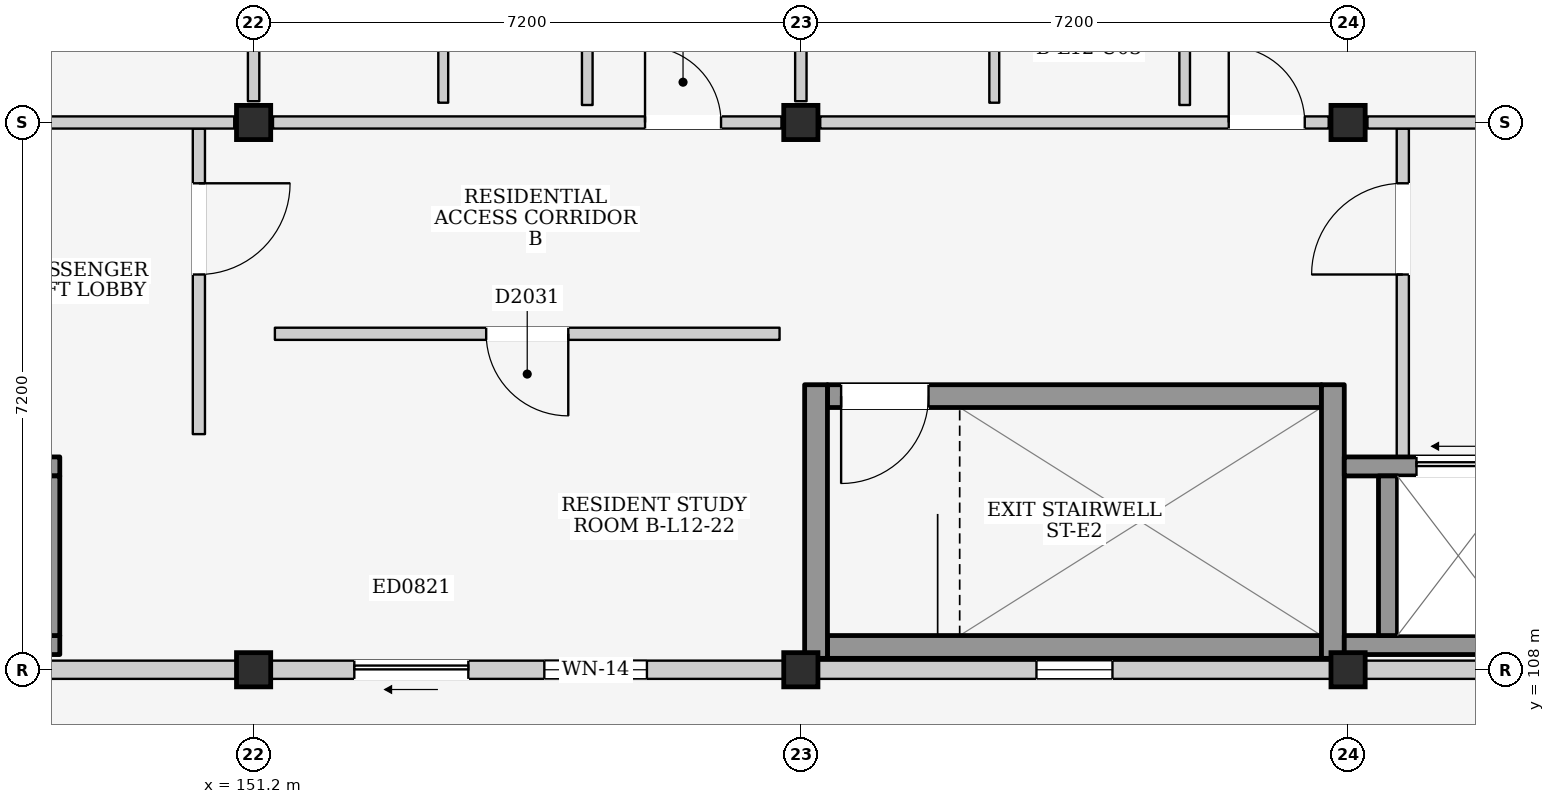
"""IFC4 building model, lengths in metres.
Left out: names, types, materials, properties, quantities, classifications, styles, units other than length and angle.
Written with IfcOpenShell. Run it as: python <this file> out.ifc"""

import sys

from ifc_helpers import new_model, si_unit, direction, frame, frame_2d, origin, origin_2d, place, context, subcontext, project, spatial, rectangle, extrude, element, fill, save


model = new_model("IFC4")
c1 = context("Model", 3, precision=1e-05, world=origin(), true_north=direction((0.0, 1.0)))
c2 = subcontext(c1, "Body", "Model", "MODEL_VIEW")
j1 = project(units=[si_unit("LENGTHUNIT", "METRE"), si_unit("PLANEANGLEUNIT", "RADIAN")], contexts=[c1])
p1 = place(None, origin())
s1 = spatial("IfcSite", under=j1, at=p1, CompositionType="ELEMENT")
p2 = place(p1, origin())
s2 = spatial("IfcBuilding", under=s1, at=p2, CompositionType="ELEMENT")
p3 = place(p2, frame((0.0, 0.0, 41.2)))
s3 = spatial("IfcBuildingStorey", under=s2, at=p3, CompositionType="ELEMENT", Elevation=41.2)
for number, where, z_axis, x_axis in (
    (1, (151.2, 108.0, 0.0), (0.0, 0.0, 1.0), (1.0, 0.0, 0.0)),
    (2, (151.2, 115.2, 0.0), (0.0, 0.0, 1.0), (1.0, 0.0, 0.0)),
    (3, (158.4, 108.0, 0.0), (0.0, 0.0, 1.0), (1.0, 0.0, 0.0)),
    (4, (158.4, 115.2, 0.0), (0.0, 0.0, 1.0), (1.0, 0.0, 0.0)),
    (5, (165.6, 108.0, 0.0), (0.0, 0.0, 1.0), (1.0, 0.0, 0.0)),
    (6, (165.6, 115.2, 0.0), (0.0, 0.0, 1.0), (1.0, 0.0, 0.0)),
):
    element("IfcColumn", number, at=place(p3, frame(where, z_axis=z_axis, x_axis=x_axis)), inside=s3, PredefinedType="COLUMN", context=c2, shape_type="SweptSolid", body=[
        extrude(rectangle(XDim=0.45, YDim=0.45, at=origin_2d()), origin(), (0.0, 0.0, 1.0), 3.2),
    ])
p4 = place(p3, frame((144.225, 108.0, 0.0), z_axis=(0.0, 0.0, 1.0), x_axis=(1.0, 0.0, 0.0)))
e7 = element("IfcWall", 7, at=p4, inside=s3, PredefinedType="ELEMENTEDWALL", context=c2, shape_type="SweptSolid", body=[
    extrude(rectangle(XDim=6.75, YDim=0.24, at=frame_2d((3.375, 0.0))), origin(), (0.0, 0.0, 1.0), 2.345),
])
p5 = place(p4, frame((2.875, 0.0, 1.2)))
e8 = element("IfcOpeningElement", 8, at=p5, cuts=e7, PredefinedType="OPENING", context=c2, shape_type="SweptSolid", body=[
    extrude(rectangle(XDim=1.0, YDim=0.9, at=frame_2d((0.5, 0.45))), frame((0.0, 0.135, 0.0), z_axis=(0.0, -1.0, 0.0), x_axis=(1.0, 0.0, 0.0)), (0.0, 0.0, 1.0), 0.27),
])
p6 = place(p3, frame((151.425, 108.0, 0.0), z_axis=(0.0, 0.0, 1.0), x_axis=(1.0, 0.0, 0.0)))
e9 = element("IfcWall", 9, at=p6, inside=s3, PredefinedType="ELEMENTEDWALL", context=c2, shape_type="SweptSolid", body=[
    extrude(rectangle(XDim=6.75, YDim=0.24, at=frame_2d((3.375, 0.0))), origin(), (0.0, 0.0, 1.0), 2.345),
])
p7 = place(p6, frame((1.1, 0.0, 0.0)))
e10 = element("IfcOpeningElement", 10, at=p7, cuts=e9, PredefinedType="OPENING", context=c2, shape_type="SweptSolid", body=[
    extrude(rectangle(XDim=1.5, YDim=2.12, at=frame_2d((0.75, 1.06))), frame((0.0, 0.135, 0.0), z_axis=(0.0, -1.0, 0.0), x_axis=(1.0, 0.0, 0.0)), (0.0, 0.0, 1.0), 0.27),
])
p8 = place(p6, frame((3.6, 0.0, 0.735)))
e11 = element("IfcOpeningElement", 11, at=p8, cuts=e9, PredefinedType="OPENING", context=c2, shape_type="SweptSolid", body=[
    extrude(rectangle(XDim=1.35, YDim=1.5, at=frame_2d((0.675, 0.75))), frame((0.0, 0.135, 0.0), z_axis=(0.0, -1.0, 0.0), x_axis=(1.0, 0.0, 0.0)), (0.0, 0.0, 1.0), 0.27),
])
p9 = place(p3, frame((158.625, 108.0, 0.0), z_axis=(0.0, 0.0, 1.0), x_axis=(1.0, 0.0, 0.0)))
e12 = element("IfcWall", 12, at=p9, inside=s3, PredefinedType="ELEMENTEDWALL", context=c2, shape_type="SweptSolid", body=[
    extrude(rectangle(XDim=6.75, YDim=0.24, at=frame_2d((3.375, 0.0))), origin(), (0.0, 0.0, 1.0), 2.345),
])
p10 = place(p9, frame((2.875, 0.0, 1.2)))
e13 = element("IfcOpeningElement", 13, at=p10, cuts=e12, PredefinedType="OPENING", context=c2, shape_type="SweptSolid", body=[
    extrude(rectangle(XDim=1.0, YDim=0.9, at=frame_2d((0.5, 0.45))), frame((0.0, 0.135, 0.0), z_axis=(0.0, -1.0, 0.0), x_axis=(1.0, 0.0, 0.0)), (0.0, 0.0, 1.0), 0.27),
])
p11 = place(p3, frame((165.825, 108.0, 0.0), z_axis=(0.0, 0.0, 1.0), x_axis=(1.0, 0.0, 0.0)))
e14 = element("IfcWall", 14, at=p11, inside=s3, PredefinedType="ELEMENTEDWALL", context=c2, shape_type="SweptSolid", body=[
    extrude(rectangle(XDim=6.75, YDim=0.24, at=frame_2d((3.375, 0.0))), origin(), (0.0, 0.0, 1.0), 2.345),
])
p12 = place(p11, frame((2.875, 0.0, 1.2)))
e15 = element("IfcOpeningElement", 15, at=p12, cuts=e14, PredefinedType="OPENING", context=c2, shape_type="SweptSolid", body=[
    extrude(rectangle(XDim=1.0, YDim=0.9, at=frame_2d((0.5, 0.45))), frame((0.0, 0.135, 0.0), z_axis=(0.0, -1.0, 0.0), x_axis=(1.0, 0.0, 0.0)), (0.0, 0.0, 1.0), 0.27),
])
p13 = place(p3, frame((150.48, 111.1, 0.0), z_axis=(0.0, 0.0, 1.0), x_axis=(0.0, 1.0, 0.0)))
e16 = element("IfcWall", 16, at=p13, inside=s3, PredefinedType="PARTITIONING", context=c2, shape_type="SweptSolid", body=[
    extrude(rectangle(XDim=4.02, YDim=0.16, at=frame_2d((2.01, 0.0))), origin(), (0.0, 0.0, 1.0), 2.95),
])
p14 = place(p13, frame((2.1, 0.0, 0.0)))
e17 = element("IfcOpeningElement", 17, at=p14, cuts=e16, PredefinedType="OPENING", context=c2, shape_type="SweptSolid", body=[
    extrude(rectangle(XDim=1.2, YDim=2.2, at=frame_2d((0.6, 1.1))), frame((0.0, 0.095, 0.0), z_axis=(0.0, -1.0, 0.0), x_axis=(1.0, 0.0, 0.0)), (0.0, 0.0, 1.0), 0.19),
])
p15 = place(p3, frame((146.625, 108.325, 0.0), z_axis=(0.0, 0.0, 1.0), x_axis=(1.0, 0.0, 0.0)))
e18 = element("IfcWall", 18, at=p15, inside=s3, PredefinedType="SHEAR", context=c2, shape_type="SweptSolid", body=[
    extrude(rectangle(XDim=2.025, YDim=0.25, at=frame_2d((1.012, 0.0))), origin(), (0.0, 0.0, 1.0), 2.95),
])
p16 = place(p3, frame((146.625, 110.675, 0.0), z_axis=(0.0, 0.0, 1.0), x_axis=(1.0, 0.0, 0.0)))
e19 = element("IfcWall", 19, at=p16, inside=s3, PredefinedType="SHEAR", context=c2, shape_type="SweptSolid", body=[
    extrude(rectangle(XDim=2.025, YDim=0.25, at=frame_2d((1.012, 0.0))), origin(), (0.0, 0.0, 1.0), 2.95),
])
p17 = place(p16, frame((0.425, 0.0, 0.0)))
e20 = element("IfcOpeningElement", 20, at=p17, cuts=e19, PredefinedType="OPENING", context=c2, shape_type="SweptSolid", body=[
    extrude(rectangle(XDim=1.1, YDim=2.15, at=frame_2d((0.55, 1.075))), frame((0.0, 0.14, 0.0), z_axis=(0.0, -1.0, 0.0), x_axis=(1.0, 0.0, 0.0)), (0.0, 0.0, 1.0), 0.28),
])
p18 = place(p3, frame((148.525, 108.45, 0.0), z_axis=(0.0, 0.0, 1.0), x_axis=(0.0, 1.0, 0.0)))
e21 = element("IfcWall", 21, at=p18, inside=s3, PredefinedType="SHEAR", context=c2, shape_type="SweptSolid", body=[
    extrude(rectangle(XDim=2.1, YDim=0.25, at=frame_2d((1.05, 0.0))), origin(), (0.0, 0.0, 1.0), 2.95),
])
p19 = place(p3, frame((158.75, 108.3, 0.0), z_axis=(0.0, 0.0, 1.0), x_axis=(1.0, 0.0, 0.0)))
e22 = element("IfcWall", 22, at=p19, inside=s3, PredefinedType="SHEAR", context=c2, shape_type="SweptSolid", body=[
    extrude(rectangle(XDim=6.5, YDim=0.3, at=frame_2d((3.25, 0.0))), origin(), (0.0, 0.0, 1.0), 2.95),
])
p20 = place(p3, frame((158.75, 111.6, 0.0), z_axis=(0.0, 0.0, 1.0), x_axis=(1.0, 0.0, 0.0)))
e23 = element("IfcWall", 23, at=p20, inside=s3, PredefinedType="SHEAR", context=c2, shape_type="SweptSolid", body=[
    extrude(rectangle(XDim=6.5, YDim=0.3, at=frame_2d((3.25, 0.0))), origin(), (0.0, 0.0, 1.0), 2.95),
])
p21 = place(p20, frame((0.18, 0.0, 0.0)))
e24 = element("IfcOpeningElement", 24, at=p21, cuts=e23, PredefinedType="OPENING", context=c2, shape_type="SweptSolid", body=[
    extrude(rectangle(XDim=1.15, YDim=2.2, at=frame_2d((0.575, 1.1))), frame((0.0, 0.165, 0.0), z_axis=(0.0, -1.0, 0.0), x_axis=(1.0, 0.0, 0.0)), (0.0, 0.0, 1.0), 0.33),
])
for number, where, z_axis, x_axis in (
    (25, (158.6, 108.15, 0.0), (0.0, 0.0, 1.0), (0.0, 1.0, 0.0)),
    (26, (165.4, 108.15, 0.0), (0.0, 0.0, 1.0), (0.0, 1.0, 0.0)),
):
    element("IfcWall", number, at=place(p3, frame(where, z_axis=z_axis, x_axis=x_axis)), inside=s3, PredefinedType="SHEAR", context=c2, shape_type="SweptSolid", body=[
        extrude(rectangle(XDim=3.6, YDim=0.3, at=frame_2d((1.8, 0.0))), origin(), (0.0, 0.0, 1.0), 2.95),
    ])
p22 = place(p3, frame((166.32, 110.8, 0.0), z_axis=(0.0, 0.0, 1.0), x_axis=(0.0, 1.0, 0.0)))
e27 = element("IfcWall", 27, at=p22, inside=s3, PredefinedType="PARTITIONING", context=c2, shape_type="SweptSolid", body=[
    extrude(rectangle(XDim=4.32, YDim=0.16, at=frame_2d((2.16, 0.0))), origin(), (0.0, 0.0, 1.0), 2.95),
])
p23 = place(p22, frame((2.4, 0.0, 0.0)))
e28 = element("IfcOpeningElement", 28, at=p23, cuts=e27, PredefinedType="OPENING", context=c2, shape_type="SweptSolid", body=[
    extrude(rectangle(XDim=1.2, YDim=2.2, at=frame_2d((0.6, 1.1))), frame((0.0, 0.095, 0.0), z_axis=(0.0, -1.0, 0.0), x_axis=(1.0, 0.0, 0.0)), (0.0, 0.0, 1.0), 0.19),
])
p24 = place(p3, frame((165.55, 108.325, 0.0), z_axis=(0.0, 0.0, 1.0), x_axis=(1.0, 0.0, 0.0)))
e29 = element("IfcWall", 29, at=p24, inside=s3, PredefinedType="SHEAR", context=c2, shape_type="SweptSolid", body=[
    extrude(rectangle(XDim=2.55, YDim=0.25, at=frame_2d((1.275, 0.0))), origin(), (0.0, 0.0, 1.0), 2.95),
])
p25 = place(p3, frame((165.55, 110.675, 0.0), z_axis=(0.0, 0.0, 1.0), x_axis=(1.0, 0.0, 0.0)))
e30 = element("IfcWall", 30, at=p25, inside=s3, PredefinedType="SHEAR", context=c2, shape_type="SweptSolid", body=[
    extrude(rectangle(XDim=2.55, YDim=0.25, at=frame_2d((1.275, 0.0))), origin(), (0.0, 0.0, 1.0), 2.95),
])
p26 = place(p25, frame((0.95, 0.0, 0.0)))
e31 = element("IfcOpeningElement", 31, at=p26, cuts=e30, PredefinedType="OPENING", context=c2, shape_type="SweptSolid", body=[
    extrude(rectangle(XDim=1.1, YDim=2.15, at=frame_2d((0.55, 1.075))), frame((0.0, 0.14, 0.0), z_axis=(0.0, -1.0, 0.0), x_axis=(1.0, 0.0, 0.0)), (0.0, 0.0, 1.0), 0.28),
])
p27 = place(p3, frame((166.125, 108.45, 0.0), z_axis=(0.0, 0.0, 1.0), x_axis=(0.0, 1.0, 0.0)))
e32 = element("IfcWall", 32, at=p27, inside=s3, PredefinedType="SHEAR", context=c2, shape_type="SweptSolid", body=[
    extrude(rectangle(XDim=2.1, YDim=0.25, at=frame_2d((1.05, 0.0))), origin(), (0.0, 0.0, 1.0), 2.95),
])
p28 = place(p3, frame((144.255, 115.2, 0.0), z_axis=(0.0, 0.0, 1.0), x_axis=(1.0, 0.0, 0.0)))
e33 = element("IfcWall", 33, at=p28, inside=s3, PredefinedType="PARTITIONING", context=c2, shape_type="SweptSolid", body=[
    extrude(rectangle(XDim=6.69, YDim=0.16, at=frame_2d((3.345, 0.0))), origin(), (0.0, 0.0, 1.0), 2.345),
])
p29 = place(p3, frame((151.2, 115.48, 0.0), z_axis=(0.0, 0.0, 1.0), x_axis=(0.0, 1.0, 0.0)))
e34 = element("IfcWall", 34, at=p29, inside=s3, PredefinedType="PARTITIONING", context=c2, shape_type="SweptSolid", body=[
    extrude(rectangle(XDim=6.64, YDim=0.15, at=frame_2d((3.32, 0.0))), origin(), (0.0, 0.0, 1.0), 2.445),
])
p30 = place(p3, frame((151.455, 115.2, 0.0), z_axis=(0.0, 0.0, 1.0), x_axis=(1.0, 0.0, 0.0)))
e35 = element("IfcWall", 35, at=p30, inside=s3, PredefinedType="PARTITIONING", context=c2, shape_type="SweptSolid", body=[
    extrude(rectangle(XDim=6.69, YDim=0.16, at=frame_2d((3.345, 0.0))), origin(), (0.0, 0.0, 1.0), 2.345),
])
p31 = place(p30, frame((4.895, 0.0, 0.0)))
e36 = element("IfcOpeningElement", 36, at=p31, cuts=e35, PredefinedType="OPENING", context=c2, shape_type="SweptSolid", body=[
    extrude(rectangle(XDim=1.0, YDim=2.15, at=frame_2d((0.5, 1.075))), frame((0.0, 0.095, 0.0), z_axis=(0.0, -1.0, 0.0), x_axis=(1.0, 0.0, 0.0)), (0.0, 0.0, 1.0), 0.19),
])
p32 = place(p3, frame((158.4, 115.48, 0.0), z_axis=(0.0, 0.0, 1.0), x_axis=(0.0, 1.0, 0.0)))
e37 = element("IfcWall", 37, at=p32, inside=s3, PredefinedType="PARTITIONING", context=c2, shape_type="SweptSolid", body=[
    extrude(rectangle(XDim=6.64, YDim=0.15, at=frame_2d((3.32, 0.0))), origin(), (0.0, 0.0, 1.0), 2.445),
])
p33 = place(p3, frame((153.695, 115.46, 0.0), z_axis=(0.0, 0.0, 1.0), x_axis=(0.0, 1.0, 0.0)))
e38 = element("IfcWall", 38, at=p33, inside=s3, PredefinedType="PARTITIONING", context=c2, shape_type="SweptSolid", body=[
    extrude(rectangle(XDim=2.33, YDim=0.13, at=frame_2d((1.165, 0.0))), origin(), (0.0, 0.0, 1.0), 2.95),
])
p34 = place(p3, frame((155.59, 115.43, 0.0), z_axis=(0.0, 0.0, 1.0), x_axis=(0.0, 1.0, 0.0)))
e39 = element("IfcWall", 39, at=p34, inside=s3, PredefinedType="PARTITIONING", context=c2, shape_type="SweptSolid", body=[
    extrude(rectangle(XDim=2.35, YDim=0.14, at=frame_2d((1.175, 0.0))), origin(), (0.0, 0.0, 1.0), 2.95),
])
p35 = place(p3, frame((158.655, 115.2, 0.0), z_axis=(0.0, 0.0, 1.0), x_axis=(1.0, 0.0, 0.0)))
e40 = element("IfcWall", 40, at=p35, inside=s3, PredefinedType="PARTITIONING", context=c2, shape_type="SweptSolid", body=[
    extrude(rectangle(XDim=6.69, YDim=0.16, at=frame_2d((3.345, 0.0))), origin(), (0.0, 0.0, 1.0), 2.345),
])
p36 = place(p35, frame((5.375, 0.0, 0.0)))
e41 = element("IfcOpeningElement", 41, at=p36, cuts=e40, PredefinedType="OPENING", context=c2, shape_type="SweptSolid", body=[
    extrude(rectangle(XDim=1.0, YDim=2.15, at=frame_2d((0.5, 1.075))), frame((0.0, 0.095, 0.0), z_axis=(0.0, -1.0, 0.0), x_axis=(1.0, 0.0, 0.0)), (0.0, 0.0, 1.0), 0.19),
])
p37 = place(p3, frame((165.855, 115.2, 0.0), z_axis=(0.0, 0.0, 1.0), x_axis=(1.0, 0.0, 0.0)))
e42 = element("IfcWall", 42, at=p37, inside=s3, PredefinedType="PARTITIONING", context=c2, shape_type="SweptSolid", body=[
    extrude(rectangle(XDim=6.69, YDim=0.16, at=frame_2d((3.345, 0.0))), origin(), (0.0, 0.0, 1.0), 2.345),
])
p38 = place(p3, frame((160.945, 115.46, 0.0), z_axis=(0.0, 0.0, 1.0), x_axis=(0.0, 1.0, 0.0)))
e43 = element("IfcWall", 43, at=p38, inside=s3, PredefinedType="PARTITIONING", context=c2, shape_type="SweptSolid", body=[
    extrude(rectangle(XDim=3.04, YDim=0.13, at=frame_2d((1.52, 0.0))), origin(), (0.0, 0.0, 1.0), 2.95),
])
p39 = place(p3, frame((163.45, 115.43, 0.0), z_axis=(0.0, 0.0, 1.0), x_axis=(0.0, 1.0, 0.0)))
e44 = element("IfcWall", 44, at=p39, inside=s3, PredefinedType="PARTITIONING", context=c2, shape_type="SweptSolid", body=[
    extrude(rectangle(XDim=3.06, YDim=0.14, at=frame_2d((1.53, 0.0))), origin(), (0.0, 0.0, 1.0), 2.95),
])
p40 = place(p3, frame((151.48, 112.42, 0.0), z_axis=(0.0, 0.0, 1.0), x_axis=(1.0, 0.0, 0.0)))
e45 = element("IfcWall", 45, at=p40, inside=s3, PredefinedType="PARTITIONING", context=c2, shape_type="SweptSolid", body=[
    extrude(rectangle(XDim=6.64, YDim=0.16, at=frame_2d((3.32, 0.0))), origin(), (0.0, 0.0, 1.0), 2.95),
])
p41 = place(p40, frame((2.78, 0.0, 0.0)))
e46 = element("IfcOpeningElement", 46, at=p41, cuts=e45, PredefinedType="OPENING", context=c2, shape_type="SweptSolid", body=[
    extrude(rectangle(XDim=1.08, YDim=2.22, at=frame_2d((0.54, 1.11))), frame((0.0, 0.095, 0.0), z_axis=(0.0, -1.0, 0.0), x_axis=(1.0, 0.0, 0.0)), (0.0, 0.0, 1.0), 0.19),
])
p42 = place(p7, frame((1.5, 0.0, 0.0), z_axis=(0.0, 0.0, 1.0), x_axis=(-1.0, 0.0, 0.0)))
e47 = element("IfcDoor", 47, at=p42, inside=s3, OperationType="SLIDING_TO_LEFT", PredefinedType="DOOR", context=c2, shape_type="SweptSolid", body=[
    extrude(rectangle(XDim=1.5, YDim=2.12, at=frame_2d((0.75, 1.06))), frame((0.0, 0.025, 0.0), z_axis=(0.0, -1.0, 0.0), x_axis=(1.0, 0.0, 0.0)), (0.0, 0.0, 1.0), 0.05),
])
fill(e10, e47)
p43 = place(p8, origin())
e48 = element("IfcWindow", 48, at=p43, inside=s3, PartitioningType="SINGLE_PANEL", PredefinedType="WINDOW", context=c2, shape_type="SweptSolid", body=[
    extrude(rectangle(XDim=1.35, YDim=1.5, at=frame_2d((0.675, 0.75))), frame((0.0, 0.03, 0.0), z_axis=(0.0, -1.0, 0.0), x_axis=(1.0, 0.0, 0.0)), (0.0, 0.0, 1.0), 0.06),
])
fill(e11, e48)
p44 = place(p10, origin())
e49 = element("IfcWindow", 49, at=p44, inside=s3, PartitioningType="SINGLE_PANEL", PredefinedType="WINDOW", context=c2, shape_type="SweptSolid", body=[
    extrude(rectangle(XDim=1.0, YDim=0.9, at=frame_2d((0.5, 0.45))), frame((0.0, 0.03, 0.0), z_axis=(0.0, -1.0, 0.0), x_axis=(1.0, 0.0, 0.0)), (0.0, 0.0, 1.0), 0.06),
])
fill(e13, e49)
p45 = place(p14, frame((1.2, 0.0, 0.0), z_axis=(0.0, 0.0, 1.0), x_axis=(-1.0, 0.0, 0.0)))
e50 = element("IfcDoor", 50, at=p45, inside=s3, OperationType="SINGLE_SWING_LEFT", PredefinedType="DOOR", context=c2, shape_type="SweptSolid", body=[
    extrude(rectangle(XDim=1.2, YDim=2.2, at=frame_2d((0.6, 1.1))), frame((0.0, 0.025, 0.0), z_axis=(0.0, -1.0, 0.0), x_axis=(1.0, 0.0, 0.0)), (0.0, 0.0, 1.0), 0.05),
])
fill(e17, e50)
p46 = place(p21, frame((1.15, 0.0, 0.0), z_axis=(0.0, 0.0, 1.0), x_axis=(-1.0, 0.0, 0.0)))
e51 = element("IfcDoor", 51, at=p46, inside=s3, OperationType="SINGLE_SWING_RIGHT", PredefinedType="DOOR", context=c2, shape_type="SweptSolid", body=[
    extrude(rectangle(XDim=1.15, YDim=2.2, at=frame_2d((0.575, 1.1))), frame((0.0, 0.025, 0.0), z_axis=(0.0, -1.0, 0.0), x_axis=(1.0, 0.0, 0.0)), (0.0, 0.0, 1.0), 0.05),
])
fill(e24, e51)
p47 = place(p23, origin())
e52 = element("IfcDoor", 52, at=p47, inside=s3, OperationType="SINGLE_SWING_LEFT", PredefinedType="DOOR", context=c2, shape_type="SweptSolid", body=[
    extrude(rectangle(XDim=1.2, YDim=2.2, at=frame_2d((0.6, 1.1))), frame((0.0, 0.025, 0.0), z_axis=(0.0, -1.0, 0.0), x_axis=(1.0, 0.0, 0.0)), (0.0, 0.0, 1.0), 0.05),
])
fill(e28, e52)
p48 = place(p26, origin())
e53 = element("IfcDoor", 53, at=p48, inside=s3, OperationType="SLIDING_TO_LEFT", PredefinedType="DOOR", context=c2, shape_type="SweptSolid", body=[
    extrude(rectangle(XDim=1.1, YDim=2.15, at=frame_2d((0.55, 1.075))), frame((0.0, 0.025, 0.0), z_axis=(0.0, -1.0, 0.0), x_axis=(1.0, 0.0, 0.0)), (0.0, 0.0, 1.0), 0.05),
])
fill(e31, e53)
p49 = place(p31, origin())
e54 = element("IfcDoor", 54, at=p49, inside=s3, OperationType="SINGLE_SWING_LEFT", PredefinedType="DOOR", context=c2, shape_type="SweptSolid", body=[
    extrude(rectangle(XDim=1.0, YDim=2.15, at=frame_2d((0.5, 1.075))), frame((0.0, 0.025, 0.0), z_axis=(0.0, -1.0, 0.0), x_axis=(1.0, 0.0, 0.0)), (0.0, 0.0, 1.0), 0.05),
])
fill(e36, e54)
p50 = place(p36, origin())
e55 = element("IfcDoor", 55, at=p50, inside=s3, OperationType="SINGLE_SWING_LEFT", PredefinedType="DOOR", context=c2, shape_type="SweptSolid", body=[
    extrude(rectangle(XDim=1.0, YDim=2.15, at=frame_2d((0.5, 1.075))), frame((0.0, 0.025, 0.0), z_axis=(0.0, -1.0, 0.0), x_axis=(1.0, 0.0, 0.0)), (0.0, 0.0, 1.0), 0.05),
])
fill(e41, e55)
p51 = place(p41, frame((1.08, 0.0, 0.0), z_axis=(0.0, 0.0, 1.0), x_axis=(-1.0, 0.0, 0.0)))
e56 = element("IfcDoor", 56, at=p51, inside=s3, OperationType="SINGLE_SWING_LEFT", PredefinedType="DOOR", context=c2, shape_type="SweptSolid", body=[
    extrude(rectangle(XDim=1.08, YDim=2.22, at=frame_2d((0.54, 1.11))), frame((0.0, 0.025, 0.0), z_axis=(0.0, -1.0, 0.0), x_axis=(1.0, 0.0, 0.0)), (0.0, 0.0, 1.0), 0.05),
])
fill(e46, e56)
save(model, sys.argv[1])
